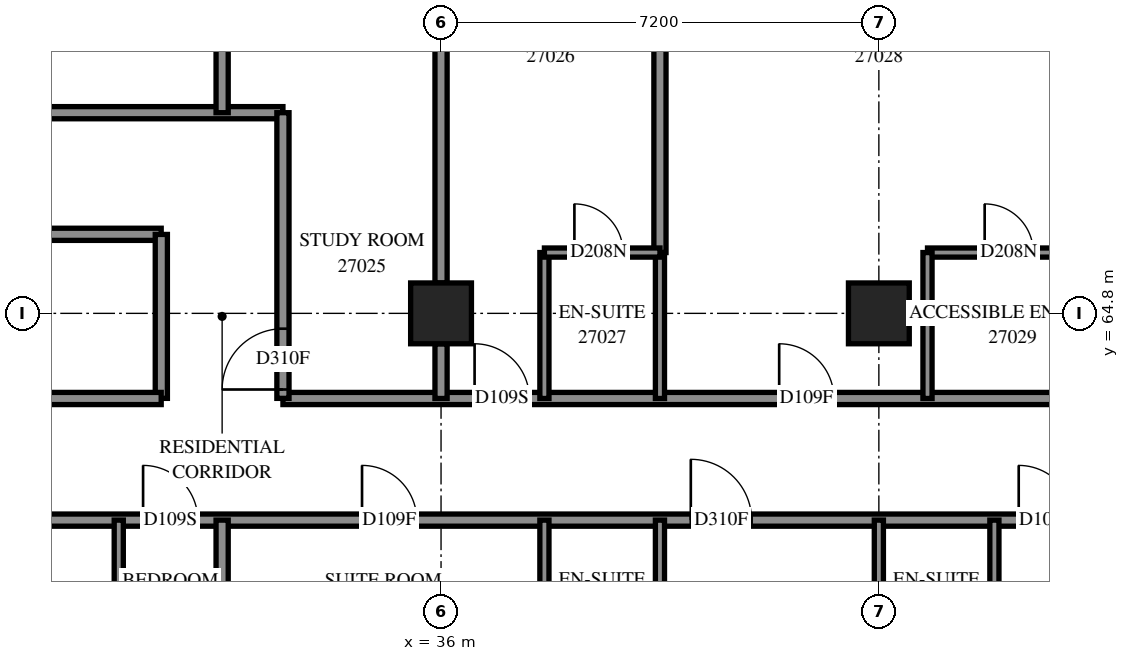
"""IFC4 building model, lengths in metres.
Left out: names, types, materials, properties, quantities, classifications, styles, units other than length and angle.
Written with IfcOpenShell. Run it as: python <this file> out.ifc"""

import sys

from ifc_helpers import new_model, si_unit, direction, frame, frame_2d, origin, origin_2d, place, context, subcontext, project, spatial, rectangle, extrude, element, fill, save


model = new_model("IFC4")
c1 = context("Model", 3, precision=1e-05, world=origin(), true_north=direction((0.0, 1.0)))
c2 = subcontext(c1, "Body", "Model", "MODEL_VIEW")
j1 = project(units=[si_unit("LENGTHUNIT", "METRE"), si_unit("PLANEANGLEUNIT", "RADIAN")], contexts=[c1])
p1 = place(None, origin())
s1 = spatial("IfcSite", under=j1, at=p1, CompositionType="ELEMENT")
p2 = place(p1, origin())
s2 = spatial("IfcBuilding", under=s1, at=p2, CompositionType="ELEMENT")
p3 = place(p2, frame((0.0, 0.0, 101.6)))
s3 = spatial("IfcBuildingStorey", under=s2, at=p3, CompositionType="ELEMENT", Elevation=101.6)
for number, where, z_axis, x_axis in (
    (1, (36.0, 64.8, 0.0), (0.0, 0.0, 1.0), (1.0, 0.0, 0.0)),
    (2, (43.2, 64.8, 0.0), (0.0, 0.0, 1.0), (1.0, 0.0, 0.0)),
):
    element("IfcColumn", number, at=place(p3, frame(where, z_axis=z_axis, x_axis=x_axis)), inside=s3, PredefinedType="COLUMN", context=c2, shape_type="SweptSolid", body=[
        extrude(rectangle(XDim=1.0, YDim=1.0, at=origin_2d()), origin(), (0.0, 0.0, 1.0), 3.1),
    ])
p4 = place(p3, frame((28.8, 61.4, 0.0), z_axis=(0.0, 0.0, 1.0), x_axis=(1.0, 0.0, 0.0)))
e3 = element("IfcWall", 3, at=p4, inside=s3, PredefinedType="PARTITIONING", context=c2, shape_type="SweptSolid", body=[
    extrude(rectangle(XDim=24.2, YDim=0.2, at=frame_2d((12.1, 0.0))), origin(), (0.0, 0.0, 1.0), 3.1),
])
p5 = place(p4, frame((2.3, 0.0, 0.0)))
e4 = element("IfcOpeningElement", 4, at=p5, cuts=e3, PredefinedType="OPENING", context=c2, shape_type="SweptSolid", body=[
    extrude(rectangle(XDim=0.9, YDim=2.1, at=frame_2d((0.45, 1.05))), frame((0.0, 0.11, 0.0), z_axis=(0.0, -1.0, 0.0), x_axis=(1.0, 0.0, 0.0)), (0.0, 0.0, 1.0), 0.22),
])
p6 = place(p4, frame((5.901, 0.0, 0.0)))
e5 = element("IfcOpeningElement", 5, at=p6, cuts=e3, PredefinedType="OPENING", context=c2, shape_type="SweptSolid", body=[
    extrude(rectangle(XDim=0.9, YDim=2.1, at=frame_2d((0.45, 1.05))), frame((0.0, 0.11, 0.0), z_axis=(0.0, -1.0, 0.0), x_axis=(1.0, 0.0, 0.0)), (0.0, 0.0, 1.0), 0.22),
])
p7 = place(p4, frame((11.307, 0.0, 0.0)))
e6 = element("IfcOpeningElement", 6, at=p7, cuts=e3, PredefinedType="OPENING", context=c2, shape_type="SweptSolid", body=[
    extrude(rectangle(XDim=1.0, YDim=2.1, at=frame_2d((0.5, 1.05))), frame((0.0, 0.11, 0.0), z_axis=(0.0, -1.0, 0.0), x_axis=(1.0, 0.0, 0.0)), (0.0, 0.0, 1.0), 0.22),
])
p8 = place(p4, frame((16.7, 0.0, 0.0)))
e7 = element("IfcOpeningElement", 7, at=p8, cuts=e3, PredefinedType="OPENING", context=c2, shape_type="SweptSolid", body=[
    extrude(rectangle(XDim=0.9, YDim=2.1, at=frame_2d((0.45, 1.05))), frame((0.0, 0.11, 0.0), z_axis=(0.0, -1.0, 0.0), x_axis=(1.0, 0.0, 0.0)), (0.0, 0.0, 1.0), 0.22),
])
p9 = place(p4, frame((18.508, 0.0, 0.0)))
e8 = element("IfcOpeningElement", 8, at=p9, cuts=e3, PredefinedType="OPENING", context=c2, shape_type="SweptSolid", body=[
    extrude(rectangle(XDim=1.0, YDim=2.1, at=frame_2d((0.5, 1.05))), frame((0.0, 0.11, 0.0), z_axis=(0.0, -1.0, 0.0), x_axis=(1.0, 0.0, 0.0)), (0.0, 0.0, 1.0), 0.22),
])
p10 = place(p4, frame((23.074, 0.0, 0.0)))
e9 = element("IfcOpeningElement", 9, at=p10, cuts=e3, PredefinedType="OPENING", context=c2, shape_type="SweptSolid", body=[
    extrude(rectangle(XDim=1.0, YDim=2.1, at=frame_2d((0.5, 1.05))), frame((0.0, 0.11, 0.0), z_axis=(0.0, -1.0, 0.0), x_axis=(1.0, 0.0, 0.0)), (0.0, 0.0, 1.0), 0.22),
])
p11 = place(p3, frame((33.4, 63.4, 0.0), z_axis=(0.0, 0.0, 1.0), x_axis=(1.0, 0.0, 0.0)))
e10 = element("IfcWall", 10, at=p11, inside=s3, PredefinedType="PARTITIONING", context=c2, shape_type="SweptSolid", body=[
    extrude(rectangle(XDim=21.9, YDim=0.2, at=frame_2d((10.95, 0.0))), origin(), (0.0, 0.0, 1.0), 3.1),
])
p12 = place(p11, frame((3.152, 0.0, 0.0)))
e11 = element("IfcOpeningElement", 11, at=p12, cuts=e10, PredefinedType="OPENING", context=c2, shape_type="SweptSolid", body=[
    extrude(rectangle(XDim=0.9, YDim=2.1, at=frame_2d((0.45, 1.05))), frame((0.0, 0.11, 0.0), z_axis=(0.0, -1.0, 0.0), x_axis=(1.0, 0.0, 0.0)), (0.0, 0.0, 1.0), 0.22),
])
p13 = place(p11, frame((8.161, 0.0, 0.0)))
e12 = element("IfcOpeningElement", 12, at=p13, cuts=e10, PredefinedType="OPENING", context=c2, shape_type="SweptSolid", body=[
    extrude(rectangle(XDim=0.9, YDim=2.1, at=frame_2d((0.45, 1.05))), frame((0.0, 0.11, 0.0), z_axis=(0.0, -1.0, 0.0), x_axis=(1.0, 0.0, 0.0)), (0.0, 0.0, 1.0), 0.22),
])
p14 = place(p11, frame((15.471, 0.0, 0.0)))
e13 = element("IfcOpeningElement", 13, at=p14, cuts=e10, PredefinedType="OPENING", context=c2, shape_type="SweptSolid", body=[
    extrude(rectangle(XDim=1.0, YDim=2.1, at=frame_2d((0.5, 1.05))), frame((0.0, 0.11, 0.0), z_axis=(0.0, -1.0, 0.0), x_axis=(1.0, 0.0, 0.0)), (0.0, 0.0, 1.0), 0.22),
])
p15 = place(p3, frame((21.602, 68.1, 0.0), z_axis=(0.0, 0.0, 1.0), x_axis=(1.0, 0.0, 0.0)))
e14 = element("IfcWall", 14, at=p15, inside=s3, PredefinedType="PARTITIONING", context=c2, shape_type="SweptSolid", body=[
    extrude(rectangle(XDim=11.798, YDim=0.2, at=frame_2d((5.899, 0.0))), origin(), (0.0, 0.0, 1.0), 3.1),
])
p16 = place(p15, frame((5.972, 0.0, 0.0)))
e15 = element("IfcOpeningElement", 15, at=p16, cuts=e14, PredefinedType="OPENING", context=c2, shape_type="SweptSolid", body=[
    extrude(rectangle(XDim=1.0, YDim=2.1, at=frame_2d((0.5, 1.05))), frame((0.0, 0.11, 0.0), z_axis=(0.0, -1.0, 0.0), x_axis=(1.0, 0.0, 0.0)), (0.0, 0.0, 1.0), 0.22),
])
p17 = place(p3, frame((21.602, 66.1, 0.0), z_axis=(0.0, 0.0, 1.0), x_axis=(1.0, 0.0, 0.0)))
e16 = element("IfcWall", 16, at=p17, inside=s3, PredefinedType="PARTITIONING", context=c2, shape_type="SweptSolid", body=[
    extrude(rectangle(XDim=9.796, YDim=0.2, at=frame_2d((4.898, 0.0))), origin(), (0.0, 0.0, 1.0), 3.1),
])
p18 = place(p17, frame((1.805, 0.0, 0.0)))
e17 = element("IfcOpeningElement", 17, at=p18, cuts=e16, PredefinedType="OPENING", context=c2, shape_type="SweptSolid", body=[
    extrude(rectangle(XDim=1.0, YDim=2.1, at=frame_2d((0.5, 1.05))), frame((0.0, 0.11, 0.0), z_axis=(0.0, -1.0, 0.0), x_axis=(1.0, 0.0, 0.0)), (0.0, 0.0, 1.0), 0.22),
])
p19 = place(p17, frame((5.459, 0.0, 0.0)))
e18 = element("IfcOpeningElement", 18, at=p19, cuts=e16, PredefinedType="OPENING", context=c2, shape_type="SweptSolid", body=[
    extrude(rectangle(XDim=1.0, YDim=2.1, at=frame_2d((0.5, 1.05))), frame((0.0, 0.11, 0.0), z_axis=(0.0, -1.0, 0.0), x_axis=(1.0, 0.0, 0.0)), (0.0, 0.0, 1.0), 0.22),
])
p20 = place(p3, frame((39.6, 65.8, 0.0), z_axis=(0.0, 0.0, 1.0), x_axis=(0.0, 1.0, 0.0)))
e19 = element("IfcWall", 19, at=p20, inside=s3, PredefinedType="PARTITIONING", context=c2, shape_type="SweptSolid", body=[
    extrude(rectangle(XDim=7.007, YDim=0.2, at=frame_2d((3.504, 0.0))), origin(), (0.0, 0.0, 1.0), 3.1),
])
p21 = place(p3, frame((36.0, 65.3, 0.0), z_axis=(0.0, 0.0, 1.0), x_axis=(0.0, 1.0, 0.0)))
e20 = element("IfcWall", 20, at=p21, inside=s3, PredefinedType="PARTITIONING", context=c2, shape_type="SweptSolid", body=[
    extrude(rectangle(XDim=6.2, YDim=0.2, at=frame_2d((3.1, 0.0))), origin(), (0.0, 0.0, 1.0), 3.1),
])
p22 = place(p3, frame((32.4, 55.868, 0.0), z_axis=(0.0, 0.0, 1.0), x_axis=(0.0, 1.0, 0.0)))
e21 = element("IfcWall", 21, at=p22, inside=s3, PredefinedType="PARTITIONING", context=c2, shape_type="SweptSolid", body=[
    extrude(rectangle(XDim=5.532, YDim=0.2, at=frame_2d((2.766, 0.0))), origin(), (0.0, 0.0, 1.0), 3.1),
])
p23 = place(p3, frame((32.4, 68.1, 0.0), z_axis=(0.0, 0.0, 1.0), x_axis=(0.0, 1.0, 0.0)))
e22 = element("IfcWall", 22, at=p23, inside=s3, PredefinedType="PARTITIONING", context=c2, shape_type="SweptSolid", body=[
    extrude(rectangle(XDim=4.758, YDim=0.2, at=frame_2d((2.379, 0.0))), origin(), (0.0, 0.0, 1.0), 3.1),
])
p24 = place(p3, frame((33.4, 63.402, 0.0), z_axis=(0.0, 0.0, 1.0), x_axis=(0.0, 1.0, 0.0)))
e23 = element("IfcWall", 23, at=p24, inside=s3, PredefinedType="PARTITIONING", context=c2, shape_type="SweptSolid", body=[
    extrude(rectangle(XDim=4.698, YDim=0.2, at=frame_2d((2.349, 0.0))), origin(), (0.0, 0.0, 1.0), 3.1),
])
p25 = place(p24, frame((0.146, 0.0, 0.0)))
e24 = element("IfcOpeningElement", 24, at=p25, cuts=e23, PredefinedType="OPENING", context=c2, shape_type="SweptSolid", body=[
    extrude(rectangle(XDim=1.0, YDim=2.1, at=frame_2d((0.5, 1.05))), frame((0.0, 0.11, 0.0), z_axis=(0.0, -1.0, 0.0), x_axis=(1.0, 0.0, 0.0)), (0.0, 0.0, 1.0), 0.22),
])
p26 = place(p3, frame((44.0, 65.8, 0.0), z_axis=(0.0, 0.0, 1.0), x_axis=(1.0, 0.0, 0.0)))
e25 = element("IfcWall", 25, at=p26, inside=s3, PredefinedType="PARTITIONING", context=c2, shape_type="SweptSolid", body=[
    extrude(rectangle(XDim=2.8, YDim=0.15, at=frame_2d((1.4, 0.0))), origin(), (0.0, 0.0, 1.0), 3.1),
])
p27 = place(p26, frame((0.94, 0.0, 0.0)))
e26 = element("IfcOpeningElement", 26, at=p27, cuts=e25, PredefinedType="OPENING", context=c2, shape_type="SweptSolid", body=[
    extrude(rectangle(XDim=0.8, YDim=2.1, at=frame_2d((0.4, 1.05))), frame((0.0, 0.085, 0.0), z_axis=(0.0, -1.0, 0.0), x_axis=(1.0, 0.0, 0.0)), (0.0, 0.0, 1.0), 0.17),
])
p28 = place(p3, frame((31.4, 63.402, 0.0), z_axis=(0.0, 0.0, 1.0), x_axis=(0.0, 1.0, 0.0)))
e27 = element("IfcWall", 27, at=p28, inside=s3, PredefinedType="PARTITIONING", context=c2, shape_type="SweptSolid", body=[
    extrude(rectangle(XDim=2.696, YDim=0.2, at=frame_2d((1.348, 0.0))), origin(), (0.0, 0.0, 1.0), 3.1),
])
p29 = place(p3, frame((28.802, 63.4, 0.0), z_axis=(0.0, 0.0, 1.0), x_axis=(1.0, 0.0, 0.0)))
e28 = element("IfcWall", 28, at=p29, inside=s3, PredefinedType="PARTITIONING", context=c2, shape_type="SweptSolid", body=[
    extrude(rectangle(XDim=2.596, YDim=0.2, at=frame_2d((1.298, 0.0))), origin(), (0.0, 0.0, 1.0), 3.1),
])
for number, where, z_axis, x_axis in (
    (29, (30.7, 59.0, 0.0), (0.0, 0.0, 1.0), (0.0, 1.0, 0.0)),
    (30, (37.7, 59.0, 0.0), (0.0, 0.0, 1.0), (0.0, 1.0, 0.0)),
    (31, (37.7, 63.4, 0.0), (0.0, 0.0, 1.0), (0.0, 1.0, 0.0)),
    (32, (39.6, 59.0, 0.0), (0.0, 0.0, 1.0), (0.0, 1.0, 0.0)),
    (33, (39.6, 63.4, 0.0), (0.0, 0.0, 1.0), (0.0, 1.0, 0.0)),
    (34, (45.1, 59.0, 0.0), (0.0, 0.0, 1.0), (0.0, 1.0, 0.0)),
    (35, (43.2, 59.0, 0.0), (0.0, 0.0, 1.0), (0.0, 1.0, 0.0)),
    (36, (44.0, 63.4, 0.0), (0.0, 0.0, 1.0), (0.0, 1.0, 0.0)),
):
    element("IfcWall", number, at=place(p3, frame(where, z_axis=z_axis, x_axis=x_axis)), inside=s3, PredefinedType="PARTITIONING", context=c2, shape_type="SweptSolid", body=[
        extrude(rectangle(XDim=2.4, YDim=0.15, at=frame_2d((1.2, 0.0))), origin(), (0.0, 0.0, 1.0), 3.1),
    ])
p30 = place(p3, frame((37.7, 65.8, 0.0), z_axis=(0.0, 0.0, 1.0), x_axis=(1.0, 0.0, 0.0)))
e37 = element("IfcWall", 37, at=p30, inside=s3, PredefinedType="PARTITIONING", context=c2, shape_type="SweptSolid", body=[
    extrude(rectangle(XDim=1.9, YDim=0.15, at=frame_2d((0.95, 0.0))), origin(), (0.0, 0.0, 1.0), 3.1),
])
p31 = place(p30, frame((0.493, 0.0, 0.0)))
e38 = element("IfcOpeningElement", 38, at=p31, cuts=e37, PredefinedType="OPENING", context=c2, shape_type="SweptSolid", body=[
    extrude(rectangle(XDim=0.8, YDim=2.1, at=frame_2d((0.4, 1.05))), frame((0.0, 0.085, 0.0), z_axis=(0.0, -1.0, 0.0), x_axis=(1.0, 0.0, 0.0)), (0.0, 0.0, 1.0), 0.17),
])
p32 = place(p3, frame((36.0, 63.4, 0.0), z_axis=(0.0, 0.0, 1.0), x_axis=(0.0, 1.0, 0.0)))
e39 = element("IfcWall", 39, at=p32, inside=s3, PredefinedType="PARTITIONING", context=c2, shape_type="SweptSolid", body=[
    extrude(rectangle(XDim=0.9, YDim=0.2, at=frame_2d((0.45, 0.0))), origin(), (0.0, 0.0, 1.0), 3.1),
])
p33 = place(p5, origin())
e40 = element("IfcDoor", 40, at=p33, inside=s3, OperationType="SINGLE_SWING_LEFT", PredefinedType="DOOR", context=c2, shape_type="SweptSolid", body=[
    extrude(rectangle(XDim=0.9, YDim=2.1, at=frame_2d((0.45, 1.05))), frame((0.0, 0.025, 0.0), z_axis=(0.0, -1.0, 0.0), x_axis=(1.0, 0.0, 0.0)), (0.0, 0.0, 1.0), 0.05),
])
fill(e4, e40)
p34 = place(p6, origin())
e41 = element("IfcDoor", 41, at=p34, inside=s3, OperationType="SINGLE_SWING_RIGHT", PredefinedType="DOOR", context=c2, shape_type="SweptSolid", body=[
    extrude(rectangle(XDim=0.9, YDim=2.1, at=frame_2d((0.45, 1.05))), frame((0.0, 0.025, 0.0), z_axis=(0.0, -1.0, 0.0), x_axis=(1.0, 0.0, 0.0)), (0.0, 0.0, 1.0), 0.05),
])
fill(e5, e41)
p35 = place(p25, origin())
e42 = element("IfcDoor", 42, at=p35, inside=s3, OperationType="SINGLE_SWING_LEFT", PredefinedType="DOOR", context=c2, shape_type="SweptSolid", body=[
    extrude(rectangle(XDim=1.0, YDim=2.1, at=frame_2d((0.5, 1.05))), frame((0.0, 0.025, 0.0), z_axis=(0.0, -1.0, 0.0), x_axis=(1.0, 0.0, 0.0)), (0.0, 0.0, 1.0), 0.05),
])
fill(e24, e42)
p36 = place(p12, origin())
e43 = element("IfcDoor", 43, at=p36, inside=s3, OperationType="SINGLE_SWING_RIGHT", PredefinedType="DOOR", context=c2, shape_type="SweptSolid", body=[
    extrude(rectangle(XDim=0.9, YDim=2.1, at=frame_2d((0.45, 1.05))), frame((0.0, 0.025, 0.0), z_axis=(0.0, -1.0, 0.0), x_axis=(1.0, 0.0, 0.0)), (0.0, 0.0, 1.0), 0.05),
])
fill(e11, e43)
p37 = place(p31, origin())
e44 = element("IfcDoor", 44, at=p37, inside=s3, OperationType="SINGLE_SWING_RIGHT", PredefinedType="DOOR", context=c2, shape_type="SweptSolid", body=[
    extrude(rectangle(XDim=0.8, YDim=2.1, at=frame_2d((0.4, 1.05))), frame((0.0, 0.025, 0.0), z_axis=(0.0, -1.0, 0.0), x_axis=(1.0, 0.0, 0.0)), (0.0, 0.0, 1.0), 0.05),
])
fill(e38, e44)
p38 = place(p13, origin())
e45 = element("IfcDoor", 45, at=p38, inside=s3, OperationType="SINGLE_SWING_LEFT", PredefinedType="DOOR", context=c2, shape_type="SweptSolid", body=[
    extrude(rectangle(XDim=0.9, YDim=2.1, at=frame_2d((0.45, 1.05))), frame((0.0, 0.025, 0.0), z_axis=(0.0, -1.0, 0.0), x_axis=(1.0, 0.0, 0.0)), (0.0, 0.0, 1.0), 0.05),
])
fill(e12, e45)
p39 = place(p27, origin())
e46 = element("IfcDoor", 46, at=p39, inside=s3, OperationType="SINGLE_SWING_RIGHT", PredefinedType="DOOR", context=c2, shape_type="SweptSolid", body=[
    extrude(rectangle(XDim=0.8, YDim=2.1, at=frame_2d((0.4, 1.05))), frame((0.0, 0.025, 0.0), z_axis=(0.0, -1.0, 0.0), x_axis=(1.0, 0.0, 0.0)), (0.0, 0.0, 1.0), 0.05),
])
fill(e26, e46)
p40 = place(p7, origin())
e47 = element("IfcDoor", 47, at=p40, inside=s3, OperationType="SINGLE_SWING_RIGHT", PredefinedType="DOOR", context=c2, shape_type="SweptSolid", body=[
    extrude(rectangle(XDim=1.0, YDim=2.1, at=frame_2d((0.5, 1.05))), frame((0.0, 0.025, 0.0), z_axis=(0.0, -1.0, 0.0), x_axis=(1.0, 0.0, 0.0)), (0.0, 0.0, 1.0), 0.05),
])
fill(e6, e47)
p41 = place(p8, origin())
e48 = element("IfcDoor", 48, at=p41, inside=s3, OperationType="SINGLE_SWING_LEFT", PredefinedType="DOOR", context=c2, shape_type="SweptSolid", body=[
    extrude(rectangle(XDim=0.9, YDim=2.1, at=frame_2d((0.45, 1.05))), frame((0.0, 0.025, 0.0), z_axis=(0.0, -1.0, 0.0), x_axis=(1.0, 0.0, 0.0)), (0.0, 0.0, 1.0), 0.05),
])
fill(e7, e48)
save(model, sys.argv[1])
